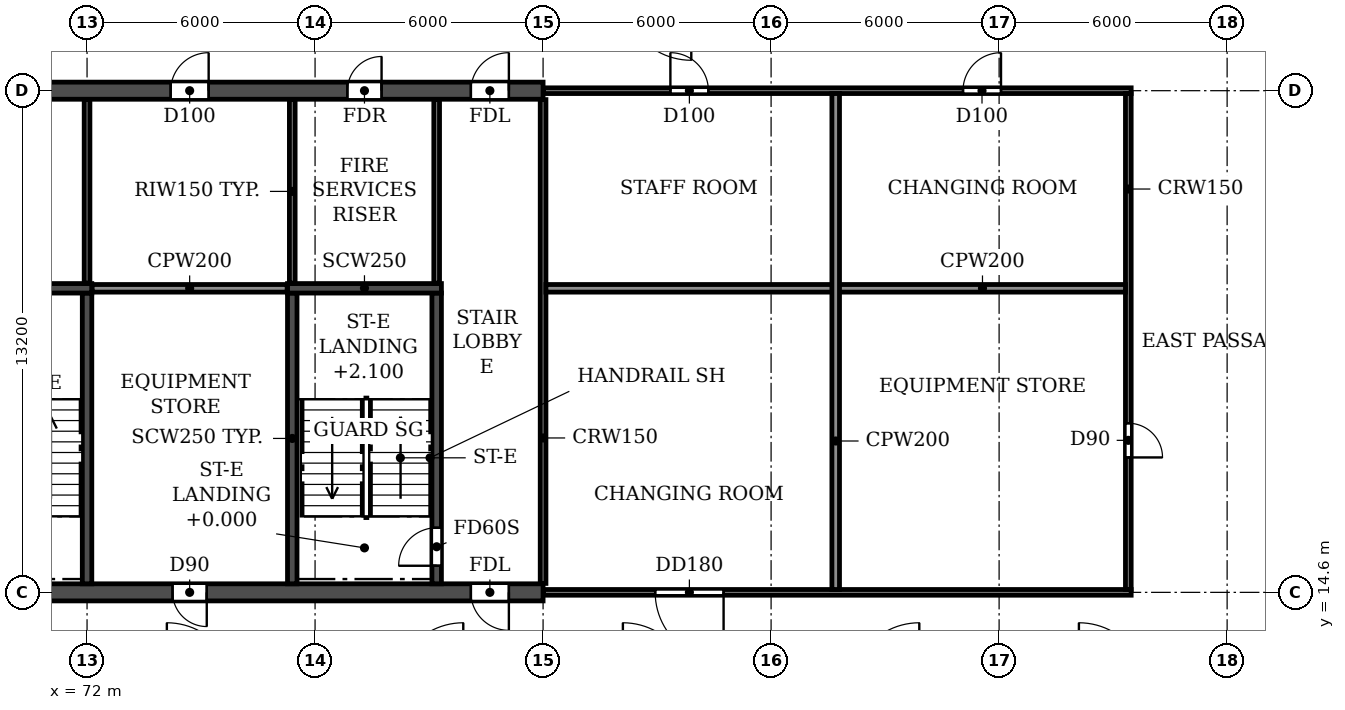
"""IFC4 building model, lengths in metres.
Left out: names, types, materials, properties, quantities, classifications, styles, units other than length and angle.
Written with IfcOpenShell. Run it as: python <this file> out.ifc"""

import sys

from ifc_helpers import new_model, si_unit, direction, frame, frame_2d, origin, place, context, subcontext, project, spatial, rectangle, extrude, element, fill, save


model = new_model("IFC4")
c1 = context("Model", 3, precision=1e-05, world=origin(), true_north=direction((0.0, 1.0)))
c2 = subcontext(c1, "Body", "Model", "MODEL_VIEW")
j1 = project(units=[si_unit("LENGTHUNIT", "METRE"), si_unit("PLANEANGLEUNIT", "RADIAN")], contexts=[c1])
p1 = place(None, origin())
s1 = spatial("IfcSite", under=j1, at=p1, CompositionType="ELEMENT")
p2 = place(p1, origin())
s2 = spatial("IfcBuilding", under=s1, at=p2, CompositionType="ELEMENT")
p3 = place(p2, frame((0.0, 0.0, 19.2)))
s3 = spatial("IfcBuildingStorey", under=s2, at=p3, CompositionType="ELEMENT", Elevation=19.2)
p4 = place(p3, frame((18.0, 14.6, 0.0), z_axis=(0.0, 0.0, 1.0), x_axis=(1.0, 0.0, 0.0)))
e1 = element("IfcWall", 1, at=p4, inside=s3, PredefinedType="SOLIDWALL", context=c2, shape_type="SweptSolid", body=[
    extrude(rectangle(XDim=66.0, YDim=0.45, at=frame_2d((33.0, 0.0))), origin(), (0.0, 0.0, 1.0), 3.95),
])
p5 = place(p4, frame((0.9, 0.0, 0.0)))
e2 = element("IfcOpeningElement", 2, at=p5, cuts=e1, PredefinedType="OPENING", context=c2, shape_type="SweptSolid", body=[
    extrude(rectangle(XDim=1.0, YDim=2.1, at=frame_2d((0.5, 1.05))), frame((0.0, 0.235, 0.0), z_axis=(0.0, -1.0, 0.0), x_axis=(1.0, 0.0, 0.0)), (0.0, 0.0, 1.0), 0.47),
])
p6 = place(p4, frame((8.8, 0.0, 0.0)))
e3 = element("IfcOpeningElement", 3, at=p6, cuts=e1, PredefinedType="OPENING", context=c2, shape_type="SweptSolid", body=[
    extrude(rectangle(XDim=1.0, YDim=2.1, at=frame_2d((0.5, 1.05))), frame((0.0, 0.235, 0.0), z_axis=(0.0, -1.0, 0.0), x_axis=(1.0, 0.0, 0.0)), (0.0, 0.0, 1.0), 0.47),
])
p7 = place(p4, frame((13.4, 0.0, 0.0)))
e4 = element("IfcOpeningElement", 4, at=p7, cuts=e1, PredefinedType="OPENING", context=c2, shape_type="SweptSolid", body=[
    extrude(rectangle(XDim=1.0, YDim=2.1, at=frame_2d((0.5, 1.05))), frame((0.0, 0.235, 0.0), z_axis=(0.0, -1.0, 0.0), x_axis=(1.0, 0.0, 0.0)), (0.0, 0.0, 1.0), 0.47),
])
p8 = place(p4, frame((27.3, 0.0, 0.0)))
e5 = element("IfcOpeningElement", 5, at=p8, cuts=e1, PredefinedType="OPENING", context=c2, shape_type="SweptSolid", body=[
    extrude(rectangle(XDim=1.0, YDim=2.1, at=frame_2d((0.5, 1.05))), frame((0.0, 0.235, 0.0), z_axis=(0.0, -1.0, 0.0), x_axis=(1.0, 0.0, 0.0)), (0.0, 0.0, 1.0), 0.47),
])
p9 = place(p4, frame((32.5, 0.0, 0.0)))
e6 = element("IfcOpeningElement", 6, at=p9, cuts=e1, PredefinedType="OPENING", context=c2, shape_type="SweptSolid", body=[
    extrude(rectangle(XDim=1.0, YDim=2.1, at=frame_2d((0.5, 1.05))), frame((0.0, 0.235, 0.0), z_axis=(0.0, -1.0, 0.0), x_axis=(1.0, 0.0, 0.0)), (0.0, 0.0, 1.0), 0.47),
])
p10 = place(p4, frame((35.1, 0.0, 0.0)))
e7 = element("IfcOpeningElement", 7, at=p10, cuts=e1, PredefinedType="OPENING", context=c2, shape_type="SweptSolid", body=[
    extrude(rectangle(XDim=1.0, YDim=2.1, at=frame_2d((0.5, 1.05))), frame((0.0, 0.235, 0.0), z_axis=(0.0, -1.0, 0.0), x_axis=(1.0, 0.0, 0.0)), (0.0, 0.0, 1.0), 0.47),
])
p11 = place(p4, frame((39.0, 0.0, 0.0)))
e8 = element("IfcOpeningElement", 8, at=p11, cuts=e1, PredefinedType="OPENING", context=c2, shape_type="SweptSolid", body=[
    extrude(rectangle(XDim=1.0, YDim=2.1, at=frame_2d((0.5, 1.05))), frame((0.0, 0.235, 0.0), z_axis=(0.0, -1.0, 0.0), x_axis=(1.0, 0.0, 0.0)), (0.0, 0.0, 1.0), 0.47),
])
p12 = place(p4, frame((51.6, 0.0, 0.0)))
e9 = element("IfcOpeningElement", 9, at=p12, cuts=e1, PredefinedType="OPENING", context=c2, shape_type="SweptSolid", body=[
    extrude(rectangle(XDim=1.0, YDim=2.1, at=frame_2d((0.5, 1.05))), frame((0.0, 0.235, 0.0), z_axis=(0.0, -1.0, 0.0), x_axis=(1.0, 0.0, 0.0)), (0.0, 0.0, 1.0), 0.47),
])
p13 = place(p4, frame((56.25, 0.0, 0.0)))
e10 = element("IfcOpeningElement", 10, at=p13, cuts=e1, PredefinedType="OPENING", context=c2, shape_type="SweptSolid", body=[
    extrude(rectangle(XDim=0.9, YDim=2.1, at=frame_2d((0.45, 1.05))), frame((0.0, 0.235, 0.0), z_axis=(0.0, -1.0, 0.0), x_axis=(1.0, 0.0, 0.0)), (0.0, 0.0, 1.0), 0.47),
])
p14 = place(p4, frame((64.1, 0.0, 0.0)))
e11 = element("IfcOpeningElement", 11, at=p14, cuts=e1, PredefinedType="OPENING", context=c2, shape_type="SweptSolid", body=[
    extrude(rectangle(XDim=1.0, YDim=2.1, at=frame_2d((0.5, 1.05))), frame((0.0, 0.235, 0.0), z_axis=(0.0, -1.0, 0.0), x_axis=(1.0, 0.0, 0.0)), (0.0, 0.0, 1.0), 0.47),
])
p15 = place(p3, frame((18.0, 27.8, 0.0), z_axis=(0.0, 0.0, 1.0), x_axis=(1.0, 0.0, 0.0)))
e12 = element("IfcWall", 12, at=p15, inside=s3, PredefinedType="SOLIDWALL", context=c2, shape_type="SweptSolid", body=[
    extrude(rectangle(XDim=66.0, YDim=0.45, at=frame_2d((33.0, 0.0))), origin(), (0.0, 0.0, 1.0), 3.95),
])
p16 = place(p15, frame((0.9, 0.0, 0.0)))
e13 = element("IfcOpeningElement", 13, at=p16, cuts=e12, PredefinedType="OPENING", context=c2, shape_type="SweptSolid", body=[
    extrude(rectangle(XDim=1.0, YDim=2.1, at=frame_2d((0.5, 1.05))), frame((0.0, 0.235, 0.0), z_axis=(0.0, -1.0, 0.0), x_axis=(1.0, 0.0, 0.0)), (0.0, 0.0, 1.0), 0.47),
])
p17 = place(p15, frame((4.25, 0.0, 0.0)))
e14 = element("IfcOpeningElement", 14, at=p17, cuts=e12, PredefinedType="OPENING", context=c2, shape_type="SweptSolid", body=[
    extrude(rectangle(XDim=0.9, YDim=2.1, at=frame_2d((0.45, 1.05))), frame((0.0, 0.235, 0.0), z_axis=(0.0, -1.0, 0.0), x_axis=(1.0, 0.0, 0.0)), (0.0, 0.0, 1.0), 0.47),
])
p18 = place(p15, frame((8.8, 0.0, 0.0)))
e15 = element("IfcOpeningElement", 15, at=p18, cuts=e12, PredefinedType="OPENING", context=c2, shape_type="SweptSolid", body=[
    extrude(rectangle(XDim=1.0, YDim=2.1, at=frame_2d((0.5, 1.05))), frame((0.0, 0.235, 0.0), z_axis=(0.0, -1.0, 0.0), x_axis=(1.0, 0.0, 0.0)), (0.0, 0.0, 1.0), 0.47),
])
p19 = place(p15, frame((13.45, 0.0, 0.0)))
e16 = element("IfcOpeningElement", 16, at=p19, cuts=e12, PredefinedType="OPENING", context=c2, shape_type="SweptSolid", body=[
    extrude(rectangle(XDim=0.9, YDim=2.1, at=frame_2d((0.45, 1.05))), frame((0.0, 0.235, 0.0), z_axis=(0.0, -1.0, 0.0), x_axis=(1.0, 0.0, 0.0)), (0.0, 0.0, 1.0), 0.47),
])
p20 = place(p15, frame((17.9, 0.0, 0.0)))
e17 = element("IfcOpeningElement", 17, at=p20, cuts=e12, PredefinedType="OPENING", context=c2, shape_type="SweptSolid", body=[
    extrude(rectangle(XDim=1.0, YDim=2.1, at=frame_2d((0.5, 1.05))), frame((0.0, 0.235, 0.0), z_axis=(0.0, -1.0, 0.0), x_axis=(1.0, 0.0, 0.0)), (0.0, 0.0, 1.0), 0.47),
])
p21 = place(p15, frame((22.85, 0.0, 0.0)))
e18 = element("IfcOpeningElement", 18, at=p21, cuts=e12, PredefinedType="OPENING", context=c2, shape_type="SweptSolid", body=[
    extrude(rectangle(XDim=1.5, YDim=2.1, at=frame_2d((0.75, 1.05))), frame((0.0, 0.235, 0.0), z_axis=(0.0, -1.0, 0.0), x_axis=(1.0, 0.0, 0.0)), (0.0, 0.0, 1.0), 0.47),
])
p22 = place(p15, frame((29.6, 0.0, 0.0)))
e19 = element("IfcOpeningElement", 19, at=p22, cuts=e12, PredefinedType="OPENING", context=c2, shape_type="SweptSolid", body=[
    extrude(rectangle(XDim=1.0, YDim=2.1, at=frame_2d((0.5, 1.05))), frame((0.0, 0.235, 0.0), z_axis=(0.0, -1.0, 0.0), x_axis=(1.0, 0.0, 0.0)), (0.0, 0.0, 1.0), 0.47),
])
p23 = place(p15, frame((32.5, 0.0, 0.0)))
e20 = element("IfcOpeningElement", 20, at=p23, cuts=e12, PredefinedType="OPENING", context=c2, shape_type="SweptSolid", body=[
    extrude(rectangle(XDim=1.0, YDim=2.1, at=frame_2d((0.5, 1.05))), frame((0.0, 0.235, 0.0), z_axis=(0.0, -1.0, 0.0), x_axis=(1.0, 0.0, 0.0)), (0.0, 0.0, 1.0), 0.47),
])
p24 = place(p15, frame((38.0, 0.0, 0.0)))
e21 = element("IfcOpeningElement", 21, at=p24, cuts=e12, PredefinedType="OPENING", context=c2, shape_type="SweptSolid", body=[
    extrude(rectangle(XDim=1.0, YDim=2.1, at=frame_2d((0.5, 1.05))), frame((0.0, 0.235, 0.0), z_axis=(0.0, -1.0, 0.0), x_axis=(1.0, 0.0, 0.0)), (0.0, 0.0, 1.0), 0.47),
])
p25 = place(p15, frame((43.2, 0.0, 0.0)))
e22 = element("IfcOpeningElement", 22, at=p25, cuts=e12, PredefinedType="OPENING", context=c2, shape_type="SweptSolid", body=[
    extrude(rectangle(XDim=1.0, YDim=2.1, at=frame_2d((0.5, 1.05))), frame((0.0, 0.235, 0.0), z_axis=(0.0, -1.0, 0.0), x_axis=(1.0, 0.0, 0.0)), (0.0, 0.0, 1.0), 0.47),
])
p26 = place(p15, frame((47.1, 0.0, 0.0)))
e23 = element("IfcOpeningElement", 23, at=p26, cuts=e12, PredefinedType="OPENING", context=c2, shape_type="SweptSolid", body=[
    extrude(rectangle(XDim=1.0, YDim=2.1, at=frame_2d((0.5, 1.05))), frame((0.0, 0.235, 0.0), z_axis=(0.0, -1.0, 0.0), x_axis=(1.0, 0.0, 0.0)), (0.0, 0.0, 1.0), 0.47),
])
p27 = place(p15, frame((51.65, 0.0, 0.0)))
e24 = element("IfcOpeningElement", 24, at=p27, cuts=e12, PredefinedType="OPENING", context=c2, shape_type="SweptSolid", body=[
    extrude(rectangle(XDim=0.9, YDim=2.1, at=frame_2d((0.45, 1.05))), frame((0.0, 0.235, 0.0), z_axis=(0.0, -1.0, 0.0), x_axis=(1.0, 0.0, 0.0)), (0.0, 0.0, 1.0), 0.47),
])
p28 = place(p15, frame((56.2, 0.0, 0.0)))
e25 = element("IfcOpeningElement", 25, at=p28, cuts=e12, PredefinedType="OPENING", context=c2, shape_type="SweptSolid", body=[
    extrude(rectangle(XDim=1.0, YDim=2.1, at=frame_2d((0.5, 1.05))), frame((0.0, 0.235, 0.0), z_axis=(0.0, -1.0, 0.0), x_axis=(1.0, 0.0, 0.0)), (0.0, 0.0, 1.0), 0.47),
])
p29 = place(p15, frame((60.85, 0.0, 0.0)))
e26 = element("IfcOpeningElement", 26, at=p29, cuts=e12, PredefinedType="OPENING", context=c2, shape_type="SweptSolid", body=[
    extrude(rectangle(XDim=0.9, YDim=2.1, at=frame_2d((0.45, 1.05))), frame((0.0, 0.235, 0.0), z_axis=(0.0, -1.0, 0.0), x_axis=(1.0, 0.0, 0.0)), (0.0, 0.0, 1.0), 0.47),
])
p30 = place(p15, frame((64.1, 0.0, 0.0)))
e27 = element("IfcOpeningElement", 27, at=p30, cuts=e12, PredefinedType="OPENING", context=c2, shape_type="SweptSolid", body=[
    extrude(rectangle(XDim=1.0, YDim=2.1, at=frame_2d((0.5, 1.05))), frame((0.0, 0.235, 0.0), z_axis=(0.0, -1.0, 0.0), x_axis=(1.0, 0.0, 0.0)), (0.0, 0.0, 1.0), 0.47),
])
p31 = place(p3, frame((72.0, 14.825, 0.0), z_axis=(0.0, 0.0, 1.0), x_axis=(0.0, 1.0, 0.0)))
e28 = element("IfcWall", 28, at=p31, inside=s3, PredefinedType="SOLIDWALL", context=c2, shape_type="SweptSolid", body=[
    extrude(rectangle(XDim=7.65, YDim=0.25, at=frame_2d((3.825, 0.0))), origin(), (0.0, 0.0, 1.0), 3.95),
])
p32 = place(p3, frame((68.075, 22.6, 0.0), z_axis=(0.0, 0.0, 1.0), x_axis=(1.0, 0.0, 0.0)))
e29 = element("IfcWall", 29, at=p32, inside=s3, PredefinedType="SOLIDWALL", context=c2, shape_type="SweptSolid", body=[
    extrude(rectangle(XDim=4.05, YDim=0.25, at=frame_2d((2.025, 0.0))), origin(), (0.0, 0.0, 1.0), 3.95),
])
p33 = place(p3, frame((77.4, 14.825, 0.0), z_axis=(0.0, 0.0, 1.0), x_axis=(0.0, 1.0, 0.0)))
e30 = element("IfcWall", 30, at=p33, inside=s3, PredefinedType="SOLIDWALL", context=c2, shape_type="SweptSolid", body=[
    extrude(rectangle(XDim=7.65, YDim=0.25, at=frame_2d((3.825, 0.0))), origin(), (0.0, 0.0, 1.0), 3.95),
])
p34 = place(p3, frame((81.2, 14.825, 0.0), z_axis=(0.0, 0.0, 1.0), x_axis=(0.0, 1.0, 0.0)))
e31 = element("IfcWall", 31, at=p34, inside=s3, PredefinedType="SOLIDWALL", context=c2, shape_type="SweptSolid", body=[
    extrude(rectangle(XDim=7.65, YDim=0.25, at=frame_2d((3.825, 0.0))), origin(), (0.0, 0.0, 1.0), 3.95),
])
p35 = place(p34, frame((0.475, 0.0, 0.0)))
e32 = element("IfcOpeningElement", 32, at=p35, cuts=e31, PredefinedType="OPENING", context=c2, shape_type="SweptSolid", body=[
    extrude(rectangle(XDim=1.0, YDim=2.1, at=frame_2d((0.5, 1.05))), frame((0.0, 0.135, 0.0), z_axis=(0.0, -1.0, 0.0), x_axis=(1.0, 0.0, 0.0)), (0.0, 0.0, 1.0), 0.27),
])
p36 = place(p3, frame((77.275, 22.6, 0.0), z_axis=(0.0, 0.0, 1.0), x_axis=(1.0, 0.0, 0.0)))
e33 = element("IfcWall", 33, at=p36, inside=s3, PredefinedType="SOLIDWALL", context=c2, shape_type="SweptSolid", body=[
    extrude(rectangle(XDim=4.05, YDim=0.25, at=frame_2d((2.025, 0.0))), origin(), (0.0, 0.0, 1.0), 3.95),
])
p37 = place(p3, frame((84.01, 14.6, 0.0), z_axis=(0.0, 0.0, 1.0), x_axis=(1.0, 0.0, 0.0)))
e34 = element("IfcWall", 34, at=p37, inside=s3, PredefinedType="PARTITIONING", context=c2, shape_type="SweptSolid", body=[
    extrude(rectangle(XDim=15.465, YDim=0.15, at=frame_2d((7.732, 0.0))), origin(), (0.0, 0.0, 1.0), 3.95),
])
p38 = place(p37, frame((2.94, 0.0, 0.0)))
e35 = element("IfcOpeningElement", 35, at=p38, cuts=e34, PredefinedType="OPENING", context=c2, shape_type="SweptSolid", body=[
    extrude(rectangle(XDim=1.8, YDim=2.1, at=frame_2d((0.9, 1.05))), frame((0.0, 0.085, 0.0), z_axis=(0.0, -1.0, 0.0), x_axis=(1.0, 0.0, 0.0)), (0.0, 0.0, 1.0), 0.17),
])
p39 = place(p3, frame((84.01, 27.8, 0.0), z_axis=(0.0, 0.0, 1.0), x_axis=(1.0, 0.0, 0.0)))
e36 = element("IfcWall", 36, at=p39, inside=s3, PredefinedType="PARTITIONING", context=c2, shape_type="SweptSolid", body=[
    extrude(rectangle(XDim=15.465, YDim=0.15, at=frame_2d((7.732, 0.0))), origin(), (0.0, 0.0, 1.0), 3.95),
])
p40 = place(p39, frame((3.34, 0.0, 0.0)))
e37 = element("IfcOpeningElement", 37, at=p40, cuts=e36, PredefinedType="OPENING", context=c2, shape_type="SweptSolid", body=[
    extrude(rectangle(XDim=1.0, YDim=2.1, at=frame_2d((0.5, 1.05))), frame((0.0, 0.085, 0.0), z_axis=(0.0, -1.0, 0.0), x_axis=(1.0, 0.0, 0.0)), (0.0, 0.0, 1.0), 0.17),
])
p41 = place(p39, frame((11.04, 0.0, 0.0)))
e38 = element("IfcOpeningElement", 38, at=p41, cuts=e36, PredefinedType="OPENING", context=c2, shape_type="SweptSolid", body=[
    extrude(rectangle(XDim=1.0, YDim=2.1, at=frame_2d((0.5, 1.05))), frame((0.0, 0.085, 0.0), z_axis=(0.0, -1.0, 0.0), x_axis=(1.0, 0.0, 0.0)), (0.0, 0.0, 1.0), 0.17),
])
p42 = place(p3, frame((84.0, 14.835, 0.0), z_axis=(0.0, 0.0, 1.0), x_axis=(0.0, 1.0, 0.0)))
e39 = element("IfcWall", 39, at=p42, inside=s3, PredefinedType="PARTITIONING", context=c2, shape_type="SweptSolid", body=[
    extrude(rectangle(XDim=12.73, YDim=0.15, at=frame_2d((6.365, 0.0))), origin(), (0.0, 0.0, 1.0), 3.95),
])
p43 = place(p3, frame((99.4, 14.675, 0.0), z_axis=(0.0, 0.0, 1.0), x_axis=(0.0, 1.0, 0.0)))
e40 = element("IfcWall", 40, at=p43, inside=s3, PredefinedType="PARTITIONING", context=c2, shape_type="SweptSolid", body=[
    extrude(rectangle(XDim=13.05, YDim=0.15, at=frame_2d((6.525, 0.0))), origin(), (0.0, 0.0, 1.0), 3.95),
])
p44 = place(p43, frame((3.475, 0.0, 0.0)))
e41 = element("IfcOpeningElement", 41, at=p44, cuts=e40, PredefinedType="OPENING", context=c2, shape_type="SweptSolid", body=[
    extrude(rectangle(XDim=0.9, YDim=2.1, at=frame_2d((0.45, 1.05))), frame((0.0, 0.085, 0.0), z_axis=(0.0, -1.0, 0.0), x_axis=(1.0, 0.0, 0.0)), (0.0, 0.0, 1.0), 0.17),
])
p45 = place(p3, frame((72.135, 22.6, 0.0), z_axis=(0.0, 0.0, 1.0), x_axis=(1.0, 0.0, 0.0)))
e42 = element("IfcWall", 42, at=p45, inside=s3, PredefinedType="PARTITIONING", context=c2, shape_type="SweptSolid", body=[
    extrude(rectangle(XDim=5.13, YDim=0.2, at=frame_2d((2.565, 0.0))), origin(), (0.0, 0.0, 1.0), 3.95),
])
p46 = place(p3, frame((84.075, 22.6, 0.0), z_axis=(0.0, 0.0, 1.0), x_axis=(1.0, 0.0, 0.0)))
e43 = element("IfcWall", 43, at=p46, inside=s3, PredefinedType="PARTITIONING", context=c2, shape_type="SweptSolid", body=[
    extrude(rectangle(XDim=15.25, YDim=0.2, at=frame_2d((7.625, 0.0))), origin(), (0.0, 0.0, 1.0), 3.95),
])
p47 = place(p3, frame((91.7, 14.675, 0.0), z_axis=(0.0, 0.0, 1.0), x_axis=(0.0, 1.0, 0.0)))
e44 = element("IfcWall", 44, at=p47, inside=s3, PredefinedType="PARTITIONING", context=c2, shape_type="SweptSolid", body=[
    extrude(rectangle(XDim=13.05, YDim=0.2, at=frame_2d((6.525, 0.0))), origin(), (0.0, 0.0, 1.0), 3.95),
])
for number, where, z_axis, x_axis in (
    (45, (72.0, 22.735, 0.0), (0.0, 0.0, 1.0), (0.0, 1.0, 0.0)),
    (46, (77.4, 22.735, 0.0), (0.0, 0.0, 1.0), (0.0, 1.0, 0.0)),
    (47, (81.2, 22.735, 0.0), (0.0, 0.0, 1.0), (0.0, 1.0, 0.0)),
):
    element("IfcWall", number, at=place(p3, frame(where, z_axis=z_axis, x_axis=x_axis)), inside=s3, PredefinedType="PARTITIONING", context=c2, shape_type="SweptSolid", body=[
        extrude(rectangle(XDim=4.83, YDim=0.15, at=frame_2d((2.415, 0.0))), origin(), (0.0, 0.0, 1.0), 3.95),
    ])
p48 = place(p44, frame((0.9, 0.0, 0.0), z_axis=(0.0, 0.0, 1.0), x_axis=(-1.0, 0.0, 0.0)))
e48 = element("IfcDoor", 48, at=p48, inside=s3, OperationType="SINGLE_SWING_RIGHT", PredefinedType="DOOR", context=c2, shape_type="SweptSolid", body=[
    extrude(rectangle(XDim=0.9, YDim=2.1, at=frame_2d((0.45, 1.05))), frame((0.0, 0.025, 0.0), z_axis=(0.0, -1.0, 0.0), x_axis=(1.0, 0.0, 0.0)), (0.0, 0.0, 1.0), 0.05),
])
fill(e41, e48)
p49 = place(p28, origin())
e49 = element("IfcDoor", 49, at=p49, inside=s3, OperationType="SINGLE_SWING_RIGHT", PredefinedType="DOOR", context=c2, shape_type="SweptSolid", body=[
    extrude(rectangle(XDim=1.0, YDim=2.1, at=frame_2d((0.5, 1.05))), frame((0.0, 0.025, 0.0), z_axis=(0.0, -1.0, 0.0), x_axis=(1.0, 0.0, 0.0)), (0.0, 0.0, 1.0), 0.05),
])
fill(e25, e49)
p50 = place(p29, origin())
e50 = element("IfcDoor", 50, at=p50, inside=s3, OperationType="SINGLE_SWING_RIGHT", PredefinedType="DOOR", context=c2, shape_type="SweptSolid", body=[
    extrude(rectangle(XDim=0.9, YDim=2.1, at=frame_2d((0.45, 1.05))), frame((0.0, 0.025, 0.0), z_axis=(0.0, -1.0, 0.0), x_axis=(1.0, 0.0, 0.0)), (0.0, 0.0, 1.0), 0.05),
])
fill(e26, e50)
p51 = place(p30, origin())
e51 = element("IfcDoor", 51, at=p51, inside=s3, OperationType="SINGLE_SWING_RIGHT", PredefinedType="DOOR", context=c2, shape_type="SweptSolid", body=[
    extrude(rectangle(XDim=1.0, YDim=2.1, at=frame_2d((0.5, 1.05))), frame((0.0, 0.025, 0.0), z_axis=(0.0, -1.0, 0.0), x_axis=(1.0, 0.0, 0.0)), (0.0, 0.0, 1.0), 0.05),
])
fill(e27, e51)
p52 = place(p40, origin())
e52 = element("IfcDoor", 52, at=p52, inside=s3, OperationType="SINGLE_SWING_LEFT", PredefinedType="DOOR", context=c2, shape_type="SweptSolid", body=[
    extrude(rectangle(XDim=1.0, YDim=2.1, at=frame_2d((0.5, 1.05))), frame((0.0, 0.025, 0.0), z_axis=(0.0, -1.0, 0.0), x_axis=(1.0, 0.0, 0.0)), (0.0, 0.0, 1.0), 0.05),
])
fill(e37, e52)
p53 = place(p41, origin())
e53 = element("IfcDoor", 53, at=p53, inside=s3, OperationType="SINGLE_SWING_RIGHT", PredefinedType="DOOR", context=c2, shape_type="SweptSolid", body=[
    extrude(rectangle(XDim=1.0, YDim=2.1, at=frame_2d((0.5, 1.05))), frame((0.0, 0.025, 0.0), z_axis=(0.0, -1.0, 0.0), x_axis=(1.0, 0.0, 0.0)), (0.0, 0.0, 1.0), 0.05),
])
fill(e38, e53)
p54 = place(p13, frame((0.9, 0.0, 0.0), z_axis=(0.0, 0.0, 1.0), x_axis=(-1.0, 0.0, 0.0)))
e54 = element("IfcDoor", 54, at=p54, inside=s3, OperationType="SINGLE_SWING_LEFT", PredefinedType="DOOR", context=c2, shape_type="SweptSolid", body=[
    extrude(rectangle(XDim=0.9, YDim=2.1, at=frame_2d((0.45, 1.05))), frame((0.0, 0.025, 0.0), z_axis=(0.0, -1.0, 0.0), x_axis=(1.0, 0.0, 0.0)), (0.0, 0.0, 1.0), 0.05),
])
fill(e10, e54)
p55 = place(p14, frame((1.0, 0.0, 0.0), z_axis=(0.0, 0.0, 1.0), x_axis=(-1.0, 0.0, 0.0)))
e55 = element("IfcDoor", 55, at=p55, inside=s3, OperationType="SINGLE_SWING_LEFT", PredefinedType="DOOR", context=c2, shape_type="SweptSolid", body=[
    extrude(rectangle(XDim=1.0, YDim=2.1, at=frame_2d((0.5, 1.05))), frame((0.0, 0.025, 0.0), z_axis=(0.0, -1.0, 0.0), x_axis=(1.0, 0.0, 0.0)), (0.0, 0.0, 1.0), 0.05),
])
fill(e11, e55)
p56 = place(p38, frame((1.8, 0.0, 0.0), z_axis=(0.0, 0.0, 1.0), x_axis=(-1.0, 0.0, 0.0)))
e56 = element("IfcDoor", 56, at=p56, inside=s3, OperationType="DOUBLE_DOOR_SINGLE_SWING", PredefinedType="DOOR", context=c2, shape_type="SweptSolid", body=[
    extrude(rectangle(XDim=1.8, YDim=2.1, at=frame_2d((0.9, 1.05))), frame((0.0, 0.025, 0.0), z_axis=(0.0, -1.0, 0.0), x_axis=(1.0, 0.0, 0.0)), (0.0, 0.0, 1.0), 0.05),
])
fill(e35, e56)
p57 = place(p35, origin())
e57 = element("IfcDoor", 57, at=p57, inside=s3, OperationType="SINGLE_SWING_LEFT", PredefinedType="DOOR", context=c2, shape_type="SweptSolid", body=[
    extrude(rectangle(XDim=1.0, YDim=2.1, at=frame_2d((0.5, 1.05))), frame((0.0, 0.025, 0.0), z_axis=(0.0, -1.0, 0.0), x_axis=(1.0, 0.0, 0.0)), (0.0, 0.0, 1.0), 0.05),
])
fill(e32, e57)
save(model, sys.argv[1])
